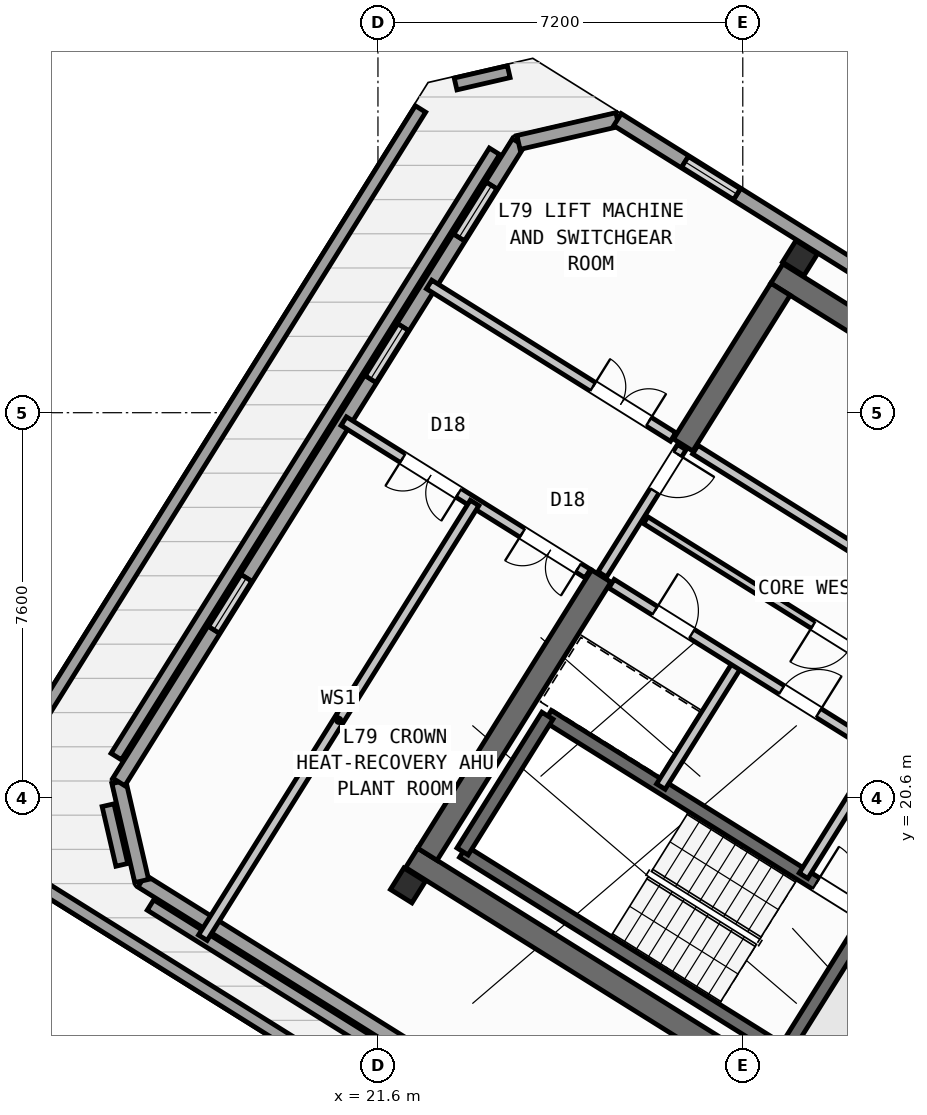
"""IFC4 building model, lengths in metres.
Left out: names, types, materials, properties, quantities, classifications, styles, units other than length and angle.
Written with IfcOpenShell. Run it as: python <this file> out.ifc"""

import sys

from ifc_helpers import new_model, si_unit, direction, frame, frame_2d, origin, origin_2d, place, context, subcontext, project, spatial, rectangle, hollow_rectangle, extrude, source, transform, mapped, element, fill, save


model = new_model("IFC4")
c1 = context("Model", 3, precision=1e-05, world=origin(), true_north=direction((0.0, 1.0)))
c2 = subcontext(c1, "Body", "Model", "MODEL_VIEW")
j1 = project(units=[si_unit("LENGTHUNIT", "METRE"), si_unit("PLANEANGLEUNIT", "RADIAN")], contexts=[c1])
p1 = place(None, origin())
s1 = spatial("IfcSite", under=j1, at=p1, CompositionType="ELEMENT")
p2 = place(p1, origin())
s2 = spatial("IfcBuilding", under=s1, at=p2, CompositionType="ELEMENT")
p3 = place(p2, frame((0.0, 0.0, 309.6)))
s3 = spatial("IfcBuildingStorey", under=s2, at=p3, CompositionType="ELEMENT", Elevation=309.6)
p4 = place(p3, frame((40.531, 24.036, 0.0), z_axis=(0.0, 0.0, 1.0), x_axis=(-0.848048787466, 0.529918157905, 0.0)))
e1 = element("IfcWall", 1, at=p4, inside=s3, PredefinedType="SHEAR", context=c2, shape_type="SweptSolid", body=[
    extrude(rectangle(XDim=13.04, YDim=0.45, at=frame_2d((6.52, 0.0))), origin(), (0.0, 0.0, 1.0), 3.32),
])
p5 = place(p3, frame((33.324, 12.503, 0.0), z_axis=(0.0, 0.0, 1.0), x_axis=(-0.848043529849, 0.529926571782, 0.0)))
e2 = element("IfcWall", 2, at=p5, inside=s3, PredefinedType="SHEAR", context=c2, shape_type="SweptSolid", body=[
    extrude(rectangle(XDim=13.04, YDim=0.45, at=frame_2d((6.52, 0.0))), origin(), (0.0, 0.0, 1.0), 3.32),
])
p6 = place(p3, frame((29.544, 30.636, 0.0), z_axis=(0.0, 0.0, 1.0), x_axis=(-0.529902075036, -0.848058836916, 0.0)))
e3 = element("IfcWall", 3, at=p6, inside=s3, PredefinedType="SHEAR", context=c2, shape_type="SweptSolid", body=[
    extrude(rectangle(XDim=3.625, YDim=0.45, at=frame_2d((1.812, 0.0))), origin(), (0.0, 0.0, 1.0), 3.32),
])
p7 = place(p3, frame((26.007, 24.976, 0.0), z_axis=(0.0, 0.0, 1.0), x_axis=(-0.529931155655, -0.848040665456, 0.0)))
e4 = element("IfcWall", 4, at=p7, inside=s3, PredefinedType="SHEAR", context=c2, shape_type="SweptSolid", body=[
    extrude(rectangle(XDim=6.475, YDim=0.45, at=frame_2d((3.238, 0.0))), origin(), (0.0, 0.0, 1.0), 3.32),
])
m1 = source(origin(), c2, "Body", "SweptSolid", [
    extrude(hollow_rectangle(XDim=0.5, YDim=0.5, WallThickness=0.025, at=origin_2d()), origin(), (0.0, 0.0, 1.0), 3.6),
])
for number, where, z_axis, x_axis in (
    (5, (29.928, 31.251, 0.0), (0.0, 0.0, 1.0), (-0.848, 0.53, 0.0)),
    (6, (22.191, 18.87, 0.0), (0.0, 0.0, 1.0), (-0.848, 0.53, 0.0)),
):
    element("IfcColumn", number, at=place(p3, frame(where, z_axis=z_axis, x_axis=x_axis)), inside=s3, PredefinedType="COLUMN", context=c2, shape_type="MappedRepresentation", body=[
        mapped(m1, transform((0.0, 0.0, 0.0), scale=1.0)),
    ])
p8 = place(p3, frame((30.343, 9.236, 0.0), z_axis=(0.0, 0.0, 1.0), x_axis=(-0.848049195283, 0.529917505259, 0.0)))
e7 = element("IfcWall", 7, at=p8, inside=s3, PredefinedType="PARAPET", context=c2, shape_type="SweptSolid", body=[
    extrude(rectangle(XDim=18.056, YDim=0.24, at=frame_2d((9.028, 0.0))), origin(), (0.0, 0.0, 1.0), 1.15),
])
p9 = place(p3, frame((14.435, 21.384, 0.0), z_axis=(0.0, 0.0, 1.0), x_axis=(0.529913222643, 0.848051871331, 0.0)))
e8 = element("IfcWall", 8, at=p9, inside=s3, PredefinedType="PARAPET", context=c2, shape_type="SweptSolid", body=[
    extrude(rectangle(XDim=15.105, YDim=0.24, at=frame_2d((7.553, 0.0))), origin(), (0.0, 0.0, 1.0), 1.15),
])
p10 = place(p3, frame((23.132, 34.688, 0.0), z_axis=(0.0, 0.0, 1.0), x_axis=(0.974383553348, 0.224892620968, 0.0)))
e9 = element("IfcWall", 9, at=p10, inside=s3, PredefinedType="PARAPET", context=c2, shape_type="SweptSolid", body=[
    extrude(rectangle(XDim=1.077, YDim=0.24, at=frame_2d((0.539, 0.0))), origin(), (0.0, 0.0, 1.0), 1.15),
])
p11 = place(p3, frame((23.899, 33.36, 0.0), z_axis=(0.0, 0.0, 1.0), x_axis=(-0.529922604627, -0.848046008837, 0.0)))
e10 = element("IfcWall", 10, at=p11, inside=s3, PredefinedType="PARAPET", context=c2, shape_type="SweptSolid", body=[
    extrude(rectangle(XDim=14.087, YDim=0.24, at=frame_2d((7.043, 0.0))), origin(), (0.0, 0.0, 1.0), 1.15),
])
p12 = place(p3, frame((16.274, 20.453, 0.0), z_axis=(0.0, 0.0, 1.0), x_axis=(0.224815250156, -0.974401407684, 0.0)))
e11 = element("IfcWall", 11, at=p12, inside=s3, PredefinedType="PARAPET", context=c2, shape_type="SweptSolid", body=[
    extrude(rectangle(XDim=1.209, YDim=0.24, at=frame_2d((0.604, 0.0))), origin(), (0.0, 0.0, 1.0), 1.15),
])
p13 = place(p3, frame((17.111, 18.483, 0.0), z_axis=(0.0, 0.0, 1.0), x_axis=(0.848046596823, -0.529921663661, 0.0)))
e12 = element("IfcWall", 12, at=p13, inside=s3, PredefinedType="PARAPET", context=c2, shape_type="SweptSolid", body=[
    extrude(rectangle(XDim=16.188, YDim=0.24, at=frame_2d((8.094, 0.0))), origin(), (0.0, 0.0, 1.0), 1.15),
])
p14 = place(p3, frame((31.34, 9.957, 0.0), z_axis=(0.0, 0.0, 1.0), x_axis=(-0.848053214258, 0.52991107347, 0.0)))
e13 = element("IfcWall", 13, at=p14, inside=s3, PredefinedType="STANDARD", context=c2, shape_type="SweptSolid", body=[
    extrude(rectangle(XDim=16.984, YDim=0.28, at=frame_2d((8.492, 0.0))), origin(), (0.0, 0.0, 1.0), 3.32),
])
p15 = place(p14, frame((7.009, 0.0, 0.95)))
e14 = element("IfcOpeningElement", 14, at=p15, cuts=e13, PredefinedType="OPENING", context=c2, shape_type="SweptSolid", body=[
    extrude(rectangle(XDim=1.25, YDim=1.4, at=frame_2d((0.625, 0.7))), frame((0.0, 0.15, 0.0), z_axis=(0.0, -1.0, 0.0), x_axis=(1.0, 0.0, 0.0)), (0.0, 0.0, 1.0), 0.3),
])
p16 = place(p3, frame((16.937, 18.957, 0.0), z_axis=(0.0, 0.0, 1.0), x_axis=(-0.224850615691, 0.974393247423, 0.0)))
e15 = element("IfcWall", 15, at=p16, inside=s3, PredefinedType="STANDARD", context=c2, shape_type="SweptSolid", body=[
    extrude(rectangle(XDim=2.005, YDim=0.28, at=frame_2d((1.003, 0.0))), origin(), (0.0, 0.0, 1.0), 3.32),
])
p17 = place(p3, frame((16.486, 20.911, 0.0), z_axis=(0.0, 0.0, 1.0), x_axis=(0.52991489513, 0.848050826259, 0.0)))
e16 = element("IfcWall", 16, at=p17, inside=s3, PredefinedType="STANDARD", context=c2, shape_type="SweptSolid", body=[
    extrude(rectangle(XDim=14.884, YDim=0.28, at=frame_2d((7.442, 0.0))), origin(), (0.0, 0.0, 1.0), 3.32),
])
p18 = place(p17, frame((3.521, 0.0, 0.95)))
e17 = element("IfcOpeningElement", 17, at=p18, cuts=e16, PredefinedType="OPENING", context=c2, shape_type="SweptSolid", body=[
    extrude(rectangle(XDim=1.25, YDim=1.4, at=frame_2d((0.625, 0.7))), frame((0.0, 0.15, 0.0), z_axis=(0.0, -1.0, 0.0), x_axis=(1.0, 0.0, 0.0)), (0.0, 0.0, 1.0), 0.3),
])
p19 = place(p17, frame((9.357, 0.0, 0.95)))
e18 = element("IfcOpeningElement", 18, at=p19, cuts=e16, PredefinedType="OPENING", context=c2, shape_type="SweptSolid", body=[
    extrude(rectangle(XDim=1.25, YDim=1.4, at=frame_2d((0.625, 0.7))), frame((0.0, 0.15, 0.0), z_axis=(0.0, -1.0, 0.0), x_axis=(1.0, 0.0, 0.0)), (0.0, 0.0, 1.0), 0.3),
])
p20 = place(p17, frame((12.653, 0.0, 0.95)))
e19 = element("IfcOpeningElement", 19, at=p20, cuts=e16, PredefinedType="OPENING", context=c2, shape_type="SweptSolid", body=[
    extrude(rectangle(XDim=1.25, YDim=1.4, at=frame_2d((0.625, 0.7))), frame((0.0, 0.15, 0.0), z_axis=(0.0, -1.0, 0.0), x_axis=(1.0, 0.0, 0.0)), (0.0, 0.0, 1.0), 0.3),
])
p21 = place(p3, frame((24.373, 33.534, 0.0), z_axis=(0.0, 0.0, 1.0), x_axis=(0.974366569301, 0.224966194411, 0.0)))
e20 = element("IfcWall", 20, at=p21, inside=s3, PredefinedType="STANDARD", context=c2, shape_type="SweptSolid", body=[
    extrude(rectangle(XDim=2.006, YDim=0.28, at=frame_2d((1.003, 0.0))), origin(), (0.0, 0.0, 1.0), 3.32),
])
p22 = place(p3, frame((26.327, 33.985, 0.0), z_axis=(0.0, 0.0, 1.0), x_axis=(0.848042717617, -0.529927871598, 0.0)))
e21 = element("IfcWall", 21, at=p22, inside=s3, PredefinedType="STANDARD", context=c2, shape_type="SweptSolid", body=[
    extrude(rectangle(XDim=16.984, YDim=0.28, at=frame_2d((8.492, 0.0))), origin(), (0.0, 0.0, 1.0), 3.32),
])
p23 = place(p22, frame((1.551, 0.0, 0.95)))
e22 = element("IfcOpeningElement", 22, at=p23, cuts=e21, PredefinedType="OPENING", context=c2, shape_type="SweptSolid", body=[
    extrude(rectangle(XDim=1.25, YDim=1.4, at=frame_2d((0.625, 0.7))), frame((0.0, 0.15, 0.0), z_axis=(0.0, -1.0, 0.0), x_axis=(1.0, 0.0, 0.0)), (0.0, 0.0, 1.0), 0.3),
])
p24 = place(p22, frame((10.193, 0.0, 0.95)))
e23 = element("IfcOpeningElement", 23, at=p24, cuts=e21, PredefinedType="OPENING", context=c2, shape_type="SweptSolid", body=[
    extrude(rectangle(XDim=1.25, YDim=1.4, at=frame_2d((0.625, 0.7))), frame((0.0, 0.15, 0.0), z_axis=(0.0, -1.0, 0.0), x_axis=(1.0, 0.0, 0.0)), (0.0, 0.0, 1.0), 0.3),
])
p25 = place(p3, frame((29.605, 15.581, 0.0), z_axis=(0.0, 0.0, 1.0), x_axis=(-0.848036911448, 0.529937163087, 0.0)))
e24 = element("IfcWall", 24, at=p25, inside=s3, PredefinedType="SHEAR", context=c2, shape_type="SweptSolid", body=[
    extrude(rectangle(XDim=7.46, YDim=0.26, at=frame_2d((3.73, 0.0))), origin(), (0.0, 0.0, 1.0), 3.32),
])
p26 = place(p3, frame((31.28, 18.261, 0.0), z_axis=(0.0, 0.0, 1.0), x_axis=(-0.848051618787, 0.529913626805, 0.0)))
e25 = element("IfcWall", 25, at=p26, inside=s3, PredefinedType="SHEAR", context=c2, shape_type="SweptSolid", body=[
    extrude(rectangle(XDim=7.46, YDim=0.26, at=frame_2d((3.73, 0.0))), origin(), (0.0, 0.0, 1.0), 3.32),
])
p27 = place(p26, frame((0.36, 0.0, 0.0)))
e26 = element("IfcOpeningElement", 26, at=p27, cuts=e25, PredefinedType="OPENING", context=c2, shape_type="SweptSolid", body=[
    extrude(rectangle(XDim=0.86, YDim=2.05, at=frame_2d((0.43, 1.025))), frame((0.0, 0.14, 0.0), z_axis=(0.0, -1.0, 0.0), x_axis=(1.0, 0.0, 0.0)), (0.0, 0.0, 1.0), 0.28),
])
p28 = place(p3, frame((31.288, 18.256, 0.0), z_axis=(0.0, 0.0, 1.0), x_axis=(-0.529943379326, -0.848033026897, 0.0)))
e27 = element("IfcWall", 27, at=p28, inside=s3, PredefinedType="SHEAR", context=c2, shape_type="SweptSolid", body=[
    extrude(rectangle(XDim=3.16, YDim=0.26, at=frame_2d((1.58, 0.0))), origin(), (0.0, 0.0, 1.0), 3.32),
])
p29 = place(p3, frame((24.945, 22.22, 0.0), z_axis=(0.0, 0.0, 1.0), x_axis=(-0.529908658664, -0.84805472316, 0.0)))
e28 = element("IfcWall", 28, at=p29, inside=s3, PredefinedType="SHEAR", context=c2, shape_type="SweptSolid", body=[
    extrude(rectangle(XDim=3.16, YDim=0.26, at=frame_2d((1.58, 0.0))), origin(), (0.0, 0.0, 1.0), 3.32),
])
p30 = place(p3, frame((31.822, 24.998, 0.0), z_axis=(0.0, 0.0, 1.0), x_axis=(-0.848054125777, 0.529909614701, 0.0)))
e29 = element("IfcWall", 29, at=p30, inside=s3, PredefinedType="STANDARD", context=c2, shape_type="SweptSolid", body=[
    extrude(rectangle(XDim=4.668, YDim=0.2, at=frame_2d((2.334, 0.0))), origin(), (0.0, 0.0, 1.0), 3.31),
])
p31 = place(p3, frame((32.108, 22.814, 0.0), z_axis=(0.0, 0.0, 1.0), x_axis=(-0.848047283855, 0.529920564185, 0.0)))
e30 = element("IfcWall", 30, at=p31, inside=s3, PredefinedType="PARTITIONING", context=c2, shape_type="SweptSolid", body=[
    extrude(rectangle(XDim=6.16, YDim=0.16, at=frame_2d((3.08, 0.0))), origin(), (0.0, 0.0, 1.0), 3.31),
])
p32 = place(p31, frame((1.4, 0.0, 0.0)))
e31 = element("IfcOpeningElement", 31, at=p32, cuts=e30, PredefinedType="OPENING", context=c2, shape_type="SweptSolid", body=[
    extrude(rectangle(XDim=0.86, YDim=2.05, at=frame_2d((0.43, 1.025))), frame((0.0, 0.09, 0.0), z_axis=(0.0, -1.0, 0.0), x_axis=(1.0, 0.0, 0.0)), (0.0, 0.0, 1.0), 0.18),
])
for number, where, z_axis, x_axis in (
    (32, (31.525, 21.504, 0.0), (0.0, 0.0, 1.0), (-0.53, -0.848, 0.0)),
    (33, (28.71, 23.263, 0.0), (0.0, 0.0, 1.0), (-0.53, -0.848, 0.0)),
):
    element("IfcWall", number, at=place(p3, frame(where, z_axis=z_axis, x_axis=x_axis)), inside=s3, PredefinedType="STANDARD", context=c2, shape_type="SweptSolid", body=[
        extrude(rectangle(XDim=2.88, YDim=0.2, at=frame_2d((1.44, 0.0))), origin(), (0.0, 0.0, 1.0), 3.31),
    ])
p33 = place(p3, frame((31.525, 21.504, 0.0), z_axis=(0.0, 0.0, 1.0), x_axis=(-0.848042066329, 0.529928913853, 0.0)))
e34 = element("IfcWall", 34, at=p33, inside=s3, PredefinedType="STANDARD", context=c2, shape_type="SweptSolid", body=[
    extrude(rectangle(XDim=6.268, YDim=0.2, at=frame_2d((3.134, 0.0))), origin(), (0.0, 0.0, 1.0), 3.31),
])
p34 = place(p33, frame((4.4, 0.0, 0.0)))
e35 = element("IfcOpeningElement", 35, at=p34, cuts=e34, PredefinedType="OPENING", context=c2, shape_type="SweptSolid", body=[
    extrude(rectangle(XDim=0.86, YDim=2.05, at=frame_2d((0.43, 1.025))), frame((0.0, 0.11, 0.0), z_axis=(0.0, -1.0, 0.0), x_axis=(1.0, 0.0, 0.0)), (0.0, 0.0, 1.0), 0.22),
])
p35 = place(p33, frame((1.45, 0.0, 0.0)))
e36 = element("IfcOpeningElement", 36, at=p35, cuts=e34, PredefinedType="OPENING", context=c2, shape_type="SweptSolid", body=[
    extrude(rectangle(XDim=0.86, YDim=2.05, at=frame_2d((0.43, 1.025))), frame((0.0, 0.11, 0.0), z_axis=(0.0, -1.0, 0.0), x_axis=(1.0, 0.0, 0.0)), (0.0, 0.0, 1.0), 0.22),
])
p36 = place(p3, frame((27.596, 27.52, 0.0), z_axis=(0.0, 0.0, 1.0), x_axis=(-0.529865479138, -0.848081702443, 0.0)))
e37 = element("IfcWall", 37, at=p36, inside=s3, PredefinedType="STANDARD", context=c2, shape_type="SweptSolid", body=[
    extrude(rectangle(XDim=2.96, YDim=0.2, at=frame_2d((1.48, 0.0))), origin(), (0.0, 0.0, 1.0), 3.31),
])
p37 = place(p36, frame((0.16, 0.0, 0.0)))
e38 = element("IfcOpeningElement", 38, at=p37, cuts=e37, PredefinedType="OPENING", context=c2, shape_type="SweptSolid", body=[
    extrude(rectangle(XDim=0.86, YDim=2.05, at=frame_2d((0.43, 1.025))), frame((0.0, 0.11, 0.0), z_axis=(0.0, -1.0, 0.0), x_axis=(1.0, 0.0, 0.0)), (0.0, 0.0, 1.0), 0.22),
])
p38 = place(p3, frame((25.74, 25.025, 0.0), z_axis=(0.0, 0.0, 1.0), x_axis=(-0.848053858841, 0.529910041898, 0.0)))
e39 = element("IfcWall", 39, at=p38, inside=s3, PredefinedType="STANDARD", context=c2, shape_type="SweptSolid", body=[
    extrude(rectangle(XDim=5.678, YDim=0.2, at=frame_2d((2.839, 0.0))), origin(), (0.0, 0.0, 1.0), 3.31),
])
p39 = place(p38, frame((0.218, 0.0, 0.0)))
e40 = element("IfcOpeningElement", 40, at=p39, cuts=e39, PredefinedType="OPENING", context=c2, shape_type="SweptSolid", body=[
    extrude(rectangle(XDim=1.3, YDim=2.15, at=frame_2d((0.65, 1.075))), frame((0.0, 0.11, 0.0), z_axis=(0.0, -1.0, 0.0), x_axis=(1.0, 0.0, 0.0)), (0.0, 0.0, 1.0), 0.22),
])
p40 = place(p38, frame((3.003, 0.0, 0.0)))
e41 = element("IfcOpeningElement", 41, at=p40, cuts=e39, PredefinedType="OPENING", context=c2, shape_type="SweptSolid", body=[
    extrude(rectangle(XDim=1.3, YDim=2.15, at=frame_2d((0.65, 1.075))), frame((0.0, 0.11, 0.0), z_axis=(0.0, -1.0, 0.0), x_axis=(1.0, 0.0, 0.0)), (0.0, 0.0, 1.0), 0.22),
])
p41 = place(p3, frame((23.507, 26.42, 0.0), z_axis=(0.0, 0.0, 1.0), x_axis=(-0.529918703348, -0.848048446636, 0.0)))
e42 = element("IfcWall", 42, at=p41, inside=s3, PredefinedType="STANDARD", context=c2, shape_type="SweptSolid", body=[
    extrude(rectangle(XDim=10.12, YDim=0.2, at=frame_2d((5.06, 0.0))), origin(), (0.0, 0.0, 1.0), 3.31),
])
p42 = place(p3, frame((27.425, 27.721, 0.0), z_axis=(0.0, 0.0, 1.0), x_axis=(-0.848053858841, 0.529910041898, 0.0)))
e43 = element("IfcWall", 43, at=p42, inside=s3, PredefinedType="STANDARD", context=c2, shape_type="SweptSolid", body=[
    extrude(rectangle(XDim=5.678, YDim=0.2, at=frame_2d((2.839, 0.0))), origin(), (0.0, 0.0, 1.0), 3.31),
])
p43 = place(p42, frame((0.568, 0.0, 0.0)))
e44 = element("IfcOpeningElement", 44, at=p43, cuts=e43, PredefinedType="OPENING", context=c2, shape_type="SweptSolid", body=[
    extrude(rectangle(XDim=1.3, YDim=2.15, at=frame_2d((0.65, 1.075))), frame((0.0, 0.11, 0.0), z_axis=(0.0, -1.0, 0.0), x_axis=(1.0, 0.0, 0.0)), (0.0, 0.0, 1.0), 0.22),
])
m2 = source(origin(), c2, "Body", "SweptSolid", [
    extrude(rectangle(XDim=1.25, YDim=1.4, at=frame_2d((0.625, 0.7))), frame((0.0, 0.03, 0.0), z_axis=(0.0, -1.0, 0.0), x_axis=(1.0, 0.0, 0.0)), (0.0, 0.0, 1.0), 0.06),
])
p44 = place(p18, origin())
e45 = element("IfcWindow", 45, at=p44, inside=s3, PartitioningType="SINGLE_PANEL", PredefinedType="WINDOW", context=c2, shape_type="MappedRepresentation", body=[
    mapped(m2, transform((0.0, 0.0, 0.0), scale=1.0)),
])
fill(e17, e45)
p45 = place(p19, origin())
e46 = element("IfcWindow", 46, at=p45, inside=s3, PartitioningType="SINGLE_PANEL", PredefinedType="WINDOW", context=c2, shape_type="MappedRepresentation", body=[
    mapped(m2, transform((0.0, 0.0, 0.0), scale=1.0)),
])
fill(e18, e46)
p46 = place(p20, origin())
e47 = element("IfcWindow", 47, at=p46, inside=s3, PartitioningType="SINGLE_PANEL", PredefinedType="WINDOW", context=c2, shape_type="MappedRepresentation", body=[
    mapped(m2, transform((0.0, 0.0, 0.0), scale=1.0)),
])
fill(e19, e47)
p47 = place(p23, origin())
e48 = element("IfcWindow", 48, at=p47, inside=s3, PartitioningType="SINGLE_PANEL", PredefinedType="WINDOW", context=c2, shape_type="MappedRepresentation", body=[
    mapped(m2, transform((0.0, 0.0, 0.0), scale=1.0)),
])
fill(e22, e48)
m3 = source(origin(), c2, "Body", "SweptSolid", [
    extrude(rectangle(XDim=0.86, YDim=2.05, at=frame_2d((0.43, 1.025))), frame((0.0, 0.025, 0.0), z_axis=(0.0, -1.0, 0.0), x_axis=(1.0, 0.0, 0.0)), (0.0, 0.0, 1.0), 0.05),
])
p48 = place(p27, frame((0.86, 0.0, 0.0), z_axis=(0.0, 0.0, 1.0), x_axis=(-1.0, 0.0, 0.0)))
e49 = element("IfcDoor", 49, at=p48, inside=s3, OperationType="SINGLE_SWING_LEFT", PredefinedType="DOOR", context=c2, shape_type="MappedRepresentation", body=[
    mapped(m3, transform((0.0, 0.0, 0.0), scale=1.0)),
])
fill(e26, e49)
p49 = place(p32, origin())
e50 = element("IfcDoor", 50, at=p49, inside=s3, OperationType="SINGLE_SWING_RIGHT", PredefinedType="DOOR", context=c2, shape_type="MappedRepresentation", body=[
    mapped(m3, transform((0.0, 0.0, 0.0), scale=1.0)),
])
fill(e31, e50)
p50 = place(p34, frame((0.86, 0.0, 0.0), z_axis=(0.0, 0.0, 1.0), x_axis=(-1.0, 0.0, 0.0)))
e51 = element("IfcDoor", 51, at=p50, inside=s3, OperationType="SINGLE_SWING_LEFT", PredefinedType="DOOR", context=c2, shape_type="MappedRepresentation", body=[
    mapped(m3, transform((0.0, 0.0, 0.0), scale=1.0)),
])
fill(e35, e51)
p51 = place(p35, frame((0.86, 0.0, 0.0), z_axis=(0.0, 0.0, 1.0), x_axis=(-1.0, 0.0, 0.0)))
e52 = element("IfcDoor", 52, at=p51, inside=s3, OperationType="SINGLE_SWING_RIGHT", PredefinedType="DOOR", context=c2, shape_type="MappedRepresentation", body=[
    mapped(m3, transform((0.0, 0.0, 0.0), scale=1.0)),
])
fill(e36, e52)
p52 = place(p37, origin())
e53 = element("IfcDoor", 53, at=p52, inside=s3, OperationType="SINGLE_SWING_LEFT", PredefinedType="DOOR", context=c2, shape_type="MappedRepresentation", body=[
    mapped(m3, transform((0.0, 0.0, 0.0), scale=1.0)),
])
fill(e38, e53)
m4 = source(origin(), c2, "Body", "SweptSolid", [
    extrude(rectangle(XDim=1.3, YDim=2.15, at=frame_2d((0.65, 1.075))), frame((0.0, 0.025, 0.0), z_axis=(0.0, -1.0, 0.0), x_axis=(1.0, 0.0, 0.0)), (0.0, 0.0, 1.0), 0.05),
])
p53 = place(p39, origin())
e54 = element("IfcDoor", 54, at=p53, inside=s3, OperationType="DOUBLE_DOOR_SINGLE_SWING", PredefinedType="DOOR", context=c2, shape_type="MappedRepresentation", body=[
    mapped(m4, transform((0.0, 0.0, 0.0), scale=1.0)),
])
fill(e40, e54)
p54 = place(p40, origin())
e55 = element("IfcDoor", 55, at=p54, inside=s3, OperationType="DOUBLE_DOOR_SINGLE_SWING", PredefinedType="DOOR", context=c2, shape_type="MappedRepresentation", body=[
    mapped(m4, transform((0.0, 0.0, 0.0), scale=1.0)),
])
fill(e41, e55)
p55 = place(p43, frame((1.3, 0.0, 0.0), z_axis=(0.0, 0.0, 1.0), x_axis=(-1.0, 0.0, 0.0)))
e56 = element("IfcDoor", 56, at=p55, inside=s3, OperationType="DOUBLE_DOOR_SINGLE_SWING", PredefinedType="DOOR", context=c2, shape_type="MappedRepresentation", body=[
    mapped(m4, transform((0.0, 0.0, 0.0), scale=1.0)),
])
fill(e44, e56)
save(model, sys.argv[1])
